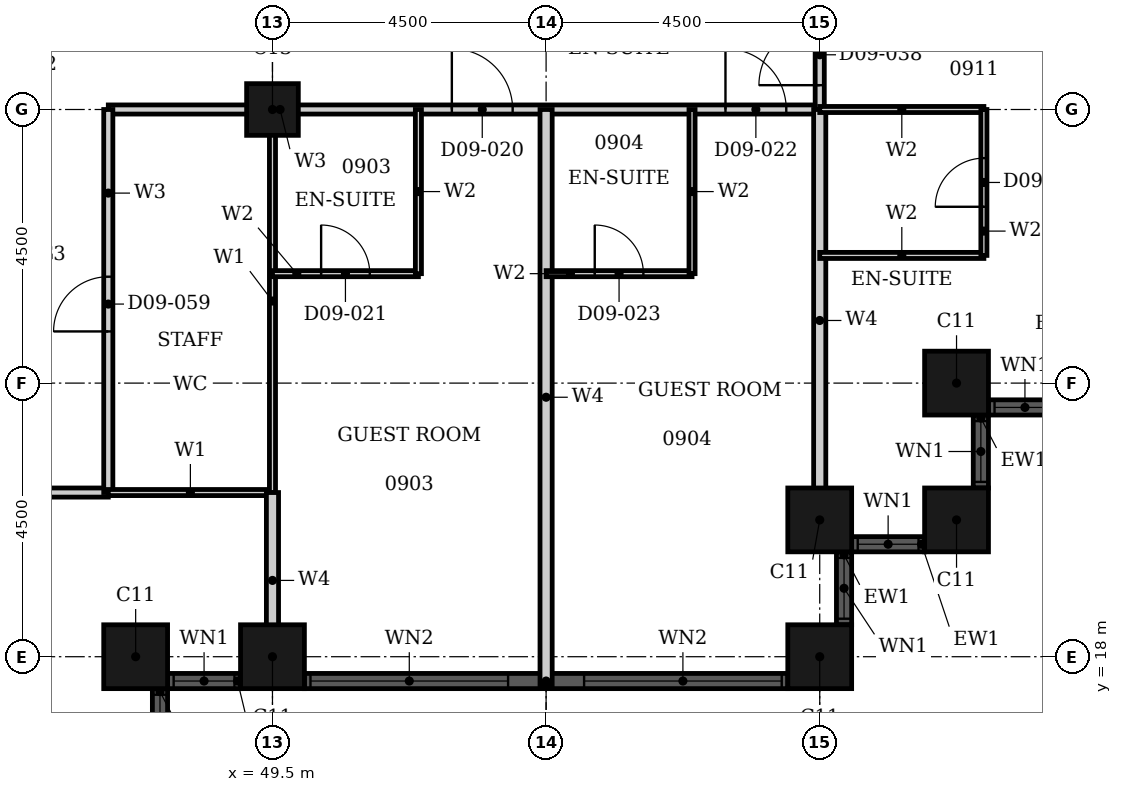
"""IFC4 building model, lengths in metres.
Left out: names, types, materials, properties, quantities, classifications, styles, units other than length and angle.
Written with IfcOpenShell. Run it as: python <this file> out.ifc"""

import sys

from ifc_helpers import new_model, si_unit, direction, frame, frame_2d, origin, origin_2d, place, context, subcontext, project, spatial, rectangle, hollow_rectangle, extrude, element, fill, save


model = new_model("IFC4")
c1 = context("Model", 3, precision=1e-05, world=origin(), true_north=direction((0.0, 1.0)))
c2 = subcontext(c1, "Body", "Model", "MODEL_VIEW")
j1 = project(units=[si_unit("LENGTHUNIT", "METRE"), si_unit("PLANEANGLEUNIT", "RADIAN")], contexts=[c1])
p1 = place(None, origin())
s1 = spatial("IfcSite", under=j1, at=p1, CompositionType="ELEMENT")
p2 = place(p1, origin())
s2 = spatial("IfcBuilding", under=s1, at=p2, CompositionType="ELEMENT")
p3 = place(p2, frame((0.0, 0.0, 44.4)))
s3 = spatial("IfcBuildingStorey", under=s2, at=p3, CompositionType="ELEMENT", Elevation=44.4)
for number, where, z_axis, x_axis in (
    (1, (47.25, 18.0, 0.0), (0.0, 0.0, 1.0), (1.0, 0.0, 0.0)),
    (2, (49.5, 18.0, 0.0), (0.0, 0.0, 1.0), (1.0, 0.0, 0.0)),
    (3, (58.5, 18.0, 0.0), (0.0, 0.0, 1.0), (1.0, 0.0, 0.0)),
    (4, (58.5, 20.25, 0.0), (0.0, 0.0, 1.0), (1.0, 0.0, 0.0)),
    (5, (60.75, 20.25, 0.0), (0.0, 0.0, 1.0), (1.0, 0.0, 0.0)),
    (6, (60.75, 22.5, 0.0), (0.0, 0.0, 1.0), (1.0, 0.0, 0.0)),
):
    element("IfcColumn", number, at=place(p3, frame(where, z_axis=z_axis, x_axis=x_axis)), inside=s3, PredefinedType="COLUMN", context=c2, shape_type="SweptSolid", body=[
        extrude(hollow_rectangle(XDim=1.05, YDim=1.05, WallThickness=0.034, at=origin_2d()), origin(), (0.0, 0.0, 1.0), 3.6),
    ])
p4 = place(p3, frame((49.5, 27.0, 0.0), z_axis=(0.0, 0.0, 1.0), x_axis=(1.0, 0.0, 0.0)))
e7 = element("IfcColumn", 7, at=p4, inside=s3, PredefinedType="COLUMN", context=c2, shape_type="SweptSolid", body=[
    extrude(hollow_rectangle(XDim=0.85, YDim=0.85, WallThickness=0.026, at=origin_2d()), origin(), (0.0, 0.0, 1.0), 3.6),
])
p5 = place(p3, frame((47.65, 16.275, 0.0), z_axis=(0.0, 0.0, 1.0), x_axis=(0.0, 1.0, 0.0)))
e8 = element("IfcWall", 8, at=p5, inside=s3, PredefinedType="SOLIDWALL", context=c2, shape_type="SweptSolid", body=[
    extrude(rectangle(XDim=1.2, YDim=0.25, at=frame_2d((0.6, 0.0))), origin(), (0.0, 0.0, 1.0), 3.6),
])
p6 = place(p5, frame((0.1, 0.0, 0.9)))
e9 = element("IfcOpeningElement", 9, at=p6, cuts=e8, PredefinedType="OPENING", context=c2, shape_type="SweptSolid", body=[
    extrude(rectangle(XDim=1.0, YDim=2.08, at=frame_2d((0.5, 1.04))), frame((0.0, 0.135, 0.0), z_axis=(0.0, -1.0, 0.0), x_axis=(1.0, 0.0, 0.0)), (0.0, 0.0, 1.0), 0.27),
])
p7 = place(p3, frame((47.775, 17.6, 0.0), z_axis=(0.0, 0.0, 1.0), x_axis=(1.0, 0.0, 0.0)))
e10 = element("IfcWall", 10, at=p7, inside=s3, PredefinedType="SOLIDWALL", context=c2, shape_type="SweptSolid", body=[
    extrude(rectangle(XDim=1.2, YDim=0.25, at=frame_2d((0.6, 0.0))), origin(), (0.0, 0.0, 1.0), 3.6),
])
p8 = place(p7, frame((0.1, 0.0, 0.9)))
e11 = element("IfcOpeningElement", 11, at=p8, cuts=e10, PredefinedType="OPENING", context=c2, shape_type="SweptSolid", body=[
    extrude(rectangle(XDim=1.0, YDim=2.08, at=frame_2d((0.5, 1.04))), frame((0.0, 0.135, 0.0), z_axis=(0.0, -1.0, 0.0), x_axis=(1.0, 0.0, 0.0)), (0.0, 0.0, 1.0), 0.27),
])
p9 = place(p3, frame((50.025, 17.6, 0.0), z_axis=(0.0, 0.0, 1.0), x_axis=(1.0, 0.0, 0.0)))
e12 = element("IfcWall", 12, at=p9, inside=s3, PredefinedType="SOLIDWALL", context=c2, shape_type="SweptSolid", body=[
    extrude(rectangle(XDim=7.95, YDim=0.25, at=frame_2d((3.975, 0.0))), origin(), (0.0, 0.0, 1.0), 3.6),
])
p10 = place(p9, frame((0.1, 0.0, 0.9)))
e13 = element("IfcOpeningElement", 13, at=p10, cuts=e12, PredefinedType="OPENING", context=c2, shape_type="SweptSolid", body=[
    extrude(rectangle(XDim=3.25, YDim=2.08, at=frame_2d((1.625, 1.04))), frame((0.0, 0.135, 0.0), z_axis=(0.0, -1.0, 0.0), x_axis=(1.0, 0.0, 0.0)), (0.0, 0.0, 1.0), 0.27),
])
p11 = place(p9, frame((4.6, 0.0, 0.9)))
e14 = element("IfcOpeningElement", 14, at=p11, cuts=e12, PredefinedType="OPENING", context=c2, shape_type="SweptSolid", body=[
    extrude(rectangle(XDim=3.25, YDim=2.08, at=frame_2d((1.625, 1.04))), frame((0.0, 0.135, 0.0), z_axis=(0.0, -1.0, 0.0), x_axis=(1.0, 0.0, 0.0)), (0.0, 0.0, 1.0), 0.27),
])
p12 = place(p3, frame((58.9, 18.525, 0.0), z_axis=(0.0, 0.0, 1.0), x_axis=(0.0, 1.0, 0.0)))
e15 = element("IfcWall", 15, at=p12, inside=s3, PredefinedType="SOLIDWALL", context=c2, shape_type="SweptSolid", body=[
    extrude(rectangle(XDim=1.2, YDim=0.25, at=frame_2d((0.6, 0.0))), origin(), (0.0, 0.0, 1.0), 3.6),
])
p13 = place(p12, frame((0.1, 0.0, 0.9)))
e16 = element("IfcOpeningElement", 16, at=p13, cuts=e15, PredefinedType="OPENING", context=c2, shape_type="SweptSolid", body=[
    extrude(rectangle(XDim=1.0, YDim=2.08, at=frame_2d((0.5, 1.04))), frame((0.0, 0.135, 0.0), z_axis=(0.0, -1.0, 0.0), x_axis=(1.0, 0.0, 0.0)), (0.0, 0.0, 1.0), 0.27),
])
p14 = place(p3, frame((59.025, 19.85, 0.0), z_axis=(0.0, 0.0, 1.0), x_axis=(1.0, 0.0, 0.0)))
e17 = element("IfcWall", 17, at=p14, inside=s3, PredefinedType="SOLIDWALL", context=c2, shape_type="SweptSolid", body=[
    extrude(rectangle(XDim=1.2, YDim=0.25, at=frame_2d((0.6, 0.0))), origin(), (0.0, 0.0, 1.0), 3.6),
])
p15 = place(p14, frame((0.1, 0.0, 0.9)))
e18 = element("IfcOpeningElement", 18, at=p15, cuts=e17, PredefinedType="OPENING", context=c2, shape_type="SweptSolid", body=[
    extrude(rectangle(XDim=1.0, YDim=2.08, at=frame_2d((0.5, 1.04))), frame((0.0, 0.135, 0.0), z_axis=(0.0, -1.0, 0.0), x_axis=(1.0, 0.0, 0.0)), (0.0, 0.0, 1.0), 0.27),
])
p16 = place(p3, frame((61.15, 20.775, 0.0), z_axis=(0.0, 0.0, 1.0), x_axis=(0.0, 1.0, 0.0)))
e19 = element("IfcWall", 19, at=p16, inside=s3, PredefinedType="SOLIDWALL", context=c2, shape_type="SweptSolid", body=[
    extrude(rectangle(XDim=1.2, YDim=0.25, at=frame_2d((0.6, 0.0))), origin(), (0.0, 0.0, 1.0), 3.6),
])
p17 = place(p16, frame((0.1, 0.0, 0.9)))
e20 = element("IfcOpeningElement", 20, at=p17, cuts=e19, PredefinedType="OPENING", context=c2, shape_type="SweptSolid", body=[
    extrude(rectangle(XDim=1.0, YDim=2.08, at=frame_2d((0.5, 1.04))), frame((0.0, 0.135, 0.0), z_axis=(0.0, -1.0, 0.0), x_axis=(1.0, 0.0, 0.0)), (0.0, 0.0, 1.0), 0.27),
])
p18 = place(p3, frame((61.275, 22.1, 0.0), z_axis=(0.0, 0.0, 1.0), x_axis=(1.0, 0.0, 0.0)))
e21 = element("IfcWall", 21, at=p18, inside=s3, PredefinedType="SOLIDWALL", context=c2, shape_type="SweptSolid", body=[
    extrude(rectangle(XDim=1.2, YDim=0.25, at=frame_2d((0.6, 0.0))), origin(), (0.0, 0.0, 1.0), 3.6),
])
p19 = place(p18, frame((0.1, 0.0, 0.9)))
e22 = element("IfcOpeningElement", 22, at=p19, cuts=e21, PredefinedType="OPENING", context=c2, shape_type="SweptSolid", body=[
    extrude(rectangle(XDim=1.0, YDim=2.08, at=frame_2d((0.5, 1.04))), frame((0.0, 0.135, 0.0), z_axis=(0.0, -1.0, 0.0), x_axis=(1.0, 0.0, 0.0)), (0.0, 0.0, 1.0), 0.27),
])
p20 = place(p3, frame((31.5, 20.7, 0.0), z_axis=(0.0, 0.0, 1.0), x_axis=(1.0, 0.0, 0.0)))
e23 = element("IfcWall", 23, at=p20, inside=s3, PredefinedType="PARTITIONING", context=c2, shape_type="SweptSolid", body=[
    extrude(rectangle(XDim=15.3, YDim=0.15, at=frame_2d((7.65, 0.0))), origin(), (0.0, 0.0, 1.0), 3.2),
])
p21 = place(p20, frame((11.95, 0.0, 0.0)))
e24 = element("IfcOpeningElement", 24, at=p21, cuts=e23, PredefinedType="OPENING", context=c2, shape_type="SweptSolid", body=[
    extrude(rectangle(XDim=1.0, YDim=2.1, at=frame_2d((0.5, 1.05))), frame((0.0, 0.085, 0.0), z_axis=(0.0, -1.0, 0.0), x_axis=(1.0, 0.0, 0.0)), (0.0, 0.0, 1.0), 0.17),
])
p22 = place(p20, frame((1.05, 0.0, 0.0)))
e25 = element("IfcOpeningElement", 25, at=p22, cuts=e23, PredefinedType="OPENING", context=c2, shape_type="SweptSolid", body=[
    extrude(rectangle(XDim=0.9, YDim=2.1, at=frame_2d((0.45, 1.05))), frame((0.0, 0.085, 0.0), z_axis=(0.0, -1.0, 0.0), x_axis=(1.0, 0.0, 0.0)), (0.0, 0.0, 1.0), 0.17),
])
p23 = place(p20, frame((5.55, 0.0, 0.0)))
e26 = element("IfcOpeningElement", 26, at=p23, cuts=e23, PredefinedType="OPENING", context=c2, shape_type="SweptSolid", body=[
    extrude(rectangle(XDim=0.9, YDim=2.1, at=frame_2d((0.45, 1.05))), frame((0.0, 0.085, 0.0), z_axis=(0.0, -1.0, 0.0), x_axis=(1.0, 0.0, 0.0)), (0.0, 0.0, 1.0), 0.17),
])
p24 = place(p3, frame((46.8, 27.0, 0.0), z_axis=(0.0, 0.0, 1.0), x_axis=(1.0, 0.0, 0.0)))
e27 = element("IfcWall", 27, at=p24, inside=s3, PredefinedType="PARTITIONING", context=c2, shape_type="SweptSolid", body=[
    extrude(rectangle(XDim=11.7, YDim=0.15, at=frame_2d((5.85, 0.0))), origin(), (0.0, 0.0, 1.0), 2.48),
])
p25 = place(p24, frame((5.65, 0.0, 0.0)))
e28 = element("IfcOpeningElement", 28, at=p25, cuts=e27, PredefinedType="OPENING", context=c2, shape_type="SweptSolid", body=[
    extrude(rectangle(XDim=1.0, YDim=2.1, at=frame_2d((0.5, 1.05))), frame((0.0, 0.085, 0.0), z_axis=(0.0, -1.0, 0.0), x_axis=(1.0, 0.0, 0.0)), (0.0, 0.0, 1.0), 0.17),
])
p26 = place(p24, frame((10.15, 0.0, 0.0)))
e29 = element("IfcOpeningElement", 29, at=p26, cuts=e27, PredefinedType="OPENING", context=c2, shape_type="SweptSolid", body=[
    extrude(rectangle(XDim=1.0, YDim=2.1, at=frame_2d((0.5, 1.05))), frame((0.0, 0.085, 0.0), z_axis=(0.0, -1.0, 0.0), x_axis=(1.0, 0.0, 0.0)), (0.0, 0.0, 1.0), 0.17),
])
p27 = place(p3, frame((46.8, 20.7, 0.0), z_axis=(0.0, 0.0, 1.0), x_axis=(0.0, 1.0, 0.0)))
e30 = element("IfcWall", 30, at=p27, inside=s3, PredefinedType="PARTITIONING", context=c2, shape_type="SweptSolid", body=[
    extrude(rectangle(XDim=6.3, YDim=0.15, at=frame_2d((3.15, 0.0))), origin(), (0.0, 0.0, 1.0), 3.2),
])
p28 = place(p27, frame((2.65, 0.0, 0.0)))
e31 = element("IfcOpeningElement", 31, at=p28, cuts=e30, PredefinedType="OPENING", context=c2, shape_type="SweptSolid", body=[
    extrude(rectangle(XDim=0.9, YDim=2.1, at=frame_2d((0.45, 1.05))), frame((0.0, 0.085, 0.0), z_axis=(0.0, -1.0, 0.0), x_axis=(1.0, 0.0, 0.0)), (0.0, 0.0, 1.0), 0.17),
])
p29 = place(p3, frame((58.5, 27.0, 0.0), z_axis=(0.0, 0.0, 1.0), x_axis=(0.0, 1.0, 0.0)))
e32 = element("IfcWall", 32, at=p29, inside=s3, PredefinedType="PARTITIONING", context=c2, shape_type="SweptSolid", body=[
    extrude(rectangle(XDim=1.8, YDim=0.15, at=frame_2d((0.9, 0.0))), origin(), (0.0, 0.0, 1.0), 3.2),
])
p30 = place(p29, frame((0.4, 0.0, 0.0)))
e33 = element("IfcOpeningElement", 33, at=p30, cuts=e32, PredefinedType="OPENING", context=c2, shape_type="SweptSolid", body=[
    extrude(rectangle(XDim=1.0, YDim=2.1, at=frame_2d((0.5, 1.05))), frame((0.0, 0.085, 0.0), z_axis=(0.0, -1.0, 0.0), x_axis=(1.0, 0.0, 0.0)), (0.0, 0.0, 1.0), 0.17),
])
p31 = place(p3, frame((46.8, 20.7, 0.0), z_axis=(0.0, 0.0, 1.0), x_axis=(1.0, 0.0, 0.0)))
e34 = element("IfcWall", 34, at=p31, inside=s3, PredefinedType="PARTITIONING", context=c2, shape_type="SweptSolid", body=[
    extrude(rectangle(XDim=2.7, YDim=0.1, at=frame_2d((1.35, 0.0))), origin(), (0.0, 0.0, 1.0), 3.2),
])
p32 = place(p3, frame((49.5, 20.7, 0.0), z_axis=(0.0, 0.0, 1.0), x_axis=(0.0, 1.0, 0.0)))
e35 = element("IfcWall", 35, at=p32, inside=s3, PredefinedType="PARTITIONING", context=c2, shape_type="SweptSolid", body=[
    extrude(rectangle(XDim=6.3, YDim=0.1, at=frame_2d((3.15, 0.0))), origin(), (0.0, 0.0, 1.0), 2.28),
])
p33 = place(p3, frame((49.5, 17.81, 0.0), z_axis=(0.0, 0.0, 1.0), x_axis=(0.0, 1.0, 0.0)))
e36 = element("IfcWall", 36, at=p33, inside=s3, PredefinedType="PARTITIONING", context=c2, shape_type="SweptSolid", body=[
    extrude(rectangle(XDim=2.89, YDim=0.2, at=frame_2d((1.445, 0.0))), origin(), (0.0, 0.0, 1.0), 2.28),
])
p34 = place(p3, frame((54.0, 17.535, 0.0), z_axis=(0.0, 0.0, 1.0), x_axis=(0.0, 1.0, 0.0)))
e37 = element("IfcWall", 37, at=p34, inside=s3, PredefinedType="PARTITIONING", context=c2, shape_type="SweptSolid", body=[
    extrude(rectangle(XDim=9.465, YDim=0.2, at=frame_2d((4.732, 0.0))), origin(), (0.0, 0.0, 1.0), 3.2),
])
p35 = place(p3, frame((58.5, 20.06, 0.0), z_axis=(0.0, 0.0, 1.0), x_axis=(0.0, 1.0, 0.0)))
e38 = element("IfcWall", 38, at=p35, inside=s3, PredefinedType="PARTITIONING", context=c2, shape_type="SweptSolid", body=[
    extrude(rectangle(XDim=6.94, YDim=0.2, at=frame_2d((3.47, 0.0))), origin(), (0.0, 0.0, 1.0), 3.2),
])
p36 = place(p3, frame((49.5, 24.3, 0.0), z_axis=(0.0, 0.0, 1.0), x_axis=(1.0, 0.0, 0.0)))
e39 = element("IfcWall", 39, at=p36, inside=s3, PredefinedType="PARTITIONING", context=c2, shape_type="SweptSolid", body=[
    extrude(rectangle(XDim=2.4, YDim=0.1, at=frame_2d((1.2, 0.0))), origin(), (0.0, 0.0, 1.0), 3.2),
])
p37 = place(p36, frame((0.8, 0.0, 0.0)))
e40 = element("IfcOpeningElement", 40, at=p37, cuts=e39, PredefinedType="OPENING", context=c2, shape_type="SweptSolid", body=[
    extrude(rectangle(XDim=0.8, YDim=2.1, at=frame_2d((0.4, 1.05))), frame((0.0, 0.06, 0.0), z_axis=(0.0, -1.0, 0.0), x_axis=(1.0, 0.0, 0.0)), (0.0, 0.0, 1.0), 0.12),
])
p38 = place(p3, frame((54.0, 24.3, 0.0), z_axis=(0.0, 0.0, 1.0), x_axis=(1.0, 0.0, 0.0)))
e41 = element("IfcWall", 41, at=p38, inside=s3, PredefinedType="PARTITIONING", context=c2, shape_type="SweptSolid", body=[
    extrude(rectangle(XDim=2.4, YDim=0.1, at=frame_2d((1.2, 0.0))), origin(), (0.0, 0.0, 1.0), 3.2),
])
p39 = place(p38, frame((0.8, 0.0, 0.0)))
e42 = element("IfcOpeningElement", 42, at=p39, cuts=e41, PredefinedType="OPENING", context=c2, shape_type="SweptSolid", body=[
    extrude(rectangle(XDim=0.8, YDim=2.1, at=frame_2d((0.4, 1.05))), frame((0.0, 0.06, 0.0), z_axis=(0.0, -1.0, 0.0), x_axis=(1.0, 0.0, 0.0)), (0.0, 0.0, 1.0), 0.12),
])
p40 = place(p3, frame((58.5, 24.6, 0.0), z_axis=(0.0, 0.0, 1.0), x_axis=(1.0, 0.0, 0.0)))
e43 = element("IfcWall", 43, at=p40, inside=s3, PredefinedType="PARTITIONING", context=c2, shape_type="SweptSolid", body=[
    extrude(rectangle(XDim=2.7, YDim=0.1, at=frame_2d((1.35, 0.0))), origin(), (0.0, 0.0, 1.0), 3.2),
])
p41 = place(p3, frame((58.5, 27.0, 0.0), z_axis=(0.0, 0.0, 1.0), x_axis=(1.0, 0.0, 0.0)))
e44 = element("IfcWall", 44, at=p41, inside=s3, PredefinedType="PARTITIONING", context=c2, shape_type="SweptSolid", body=[
    extrude(rectangle(XDim=2.7, YDim=0.1, at=frame_2d((1.35, 0.0))), origin(), (0.0, 0.0, 1.0), 2.48),
])
for number, where, z_axis, x_axis in (
    (45, (51.9, 24.3, 0.0), (0.0, 0.0, 1.0), (0.0, 1.0, 0.0)),
    (46, (56.4, 24.3, 0.0), (0.0, 0.0, 1.0), (0.0, 1.0, 0.0)),
):
    element("IfcWall", number, at=place(p3, frame(where, z_axis=z_axis, x_axis=x_axis)), inside=s3, PredefinedType="PARTITIONING", context=c2, shape_type="SweptSolid", body=[
        extrude(rectangle(XDim=2.7, YDim=0.1, at=frame_2d((1.35, 0.0))), origin(), (0.0, 0.0, 1.0), 3.2),
    ])
p42 = place(p3, frame((61.2, 24.6, 0.0), z_axis=(0.0, 0.0, 1.0), x_axis=(0.0, 1.0, 0.0)))
e47 = element("IfcWall", 47, at=p42, inside=s3, PredefinedType="PARTITIONING", context=c2, shape_type="SweptSolid", body=[
    extrude(rectangle(XDim=2.4, YDim=0.1, at=frame_2d((1.2, 0.0))), origin(), (0.0, 0.0, 1.0), 3.2),
])
p43 = place(p42, frame((0.8, 0.0, 0.0)))
e48 = element("IfcOpeningElement", 48, at=p43, cuts=e47, PredefinedType="OPENING", context=c2, shape_type="SweptSolid", body=[
    extrude(rectangle(XDim=0.8, YDim=2.1, at=frame_2d((0.4, 1.05))), frame((0.0, 0.06, 0.0), z_axis=(0.0, -1.0, 0.0), x_axis=(1.0, 0.0, 0.0)), (0.0, 0.0, 1.0), 0.12),
])
p44 = place(p6, origin())
e49 = element("IfcWindow", 49, at=p44, inside=s3, PartitioningType="SINGLE_PANEL", PredefinedType="WINDOW", context=c2, shape_type="SweptSolid", body=[
    extrude(rectangle(XDim=1.0, YDim=2.08, at=frame_2d((0.5, 1.04))), frame((0.0, 0.03, 0.0), z_axis=(0.0, -1.0, 0.0), x_axis=(1.0, 0.0, 0.0)), (0.0, 0.0, 1.0), 0.06),
])
fill(e9, e49)
p45 = place(p8, origin())
e50 = element("IfcWindow", 50, at=p45, inside=s3, PartitioningType="SINGLE_PANEL", PredefinedType="WINDOW", context=c2, shape_type="SweptSolid", body=[
    extrude(rectangle(XDim=1.0, YDim=2.08, at=frame_2d((0.5, 1.04))), frame((0.0, 0.03, 0.0), z_axis=(0.0, -1.0, 0.0), x_axis=(1.0, 0.0, 0.0)), (0.0, 0.0, 1.0), 0.06),
])
fill(e11, e50)
p46 = place(p10, origin())
e51 = element("IfcWindow", 51, at=p46, inside=s3, PartitioningType="SINGLE_PANEL", PredefinedType="WINDOW", context=c2, shape_type="SweptSolid", body=[
    extrude(rectangle(XDim=3.25, YDim=2.08, at=frame_2d((1.625, 1.04))), frame((0.0, 0.03, 0.0), z_axis=(0.0, -1.0, 0.0), x_axis=(1.0, 0.0, 0.0)), (0.0, 0.0, 1.0), 0.06),
])
fill(e13, e51)
p47 = place(p11, origin())
e52 = element("IfcWindow", 52, at=p47, inside=s3, PartitioningType="SINGLE_PANEL", PredefinedType="WINDOW", context=c2, shape_type="SweptSolid", body=[
    extrude(rectangle(XDim=3.25, YDim=2.08, at=frame_2d((1.625, 1.04))), frame((0.0, 0.03, 0.0), z_axis=(0.0, -1.0, 0.0), x_axis=(1.0, 0.0, 0.0)), (0.0, 0.0, 1.0), 0.06),
])
fill(e14, e52)
p48 = place(p13, origin())
e53 = element("IfcWindow", 53, at=p48, inside=s3, PartitioningType="SINGLE_PANEL", PredefinedType="WINDOW", context=c2, shape_type="SweptSolid", body=[
    extrude(rectangle(XDim=1.0, YDim=2.08, at=frame_2d((0.5, 1.04))), frame((0.0, 0.03, 0.0), z_axis=(0.0, -1.0, 0.0), x_axis=(1.0, 0.0, 0.0)), (0.0, 0.0, 1.0), 0.06),
])
fill(e16, e53)
p49 = place(p15, origin())
e54 = element("IfcWindow", 54, at=p49, inside=s3, PartitioningType="SINGLE_PANEL", PredefinedType="WINDOW", context=c2, shape_type="SweptSolid", body=[
    extrude(rectangle(XDim=1.0, YDim=2.08, at=frame_2d((0.5, 1.04))), frame((0.0, 0.03, 0.0), z_axis=(0.0, -1.0, 0.0), x_axis=(1.0, 0.0, 0.0)), (0.0, 0.0, 1.0), 0.06),
])
fill(e18, e54)
p50 = place(p17, origin())
e55 = element("IfcWindow", 55, at=p50, inside=s3, PartitioningType="SINGLE_PANEL", PredefinedType="WINDOW", context=c2, shape_type="SweptSolid", body=[
    extrude(rectangle(XDim=1.0, YDim=2.08, at=frame_2d((0.5, 1.04))), frame((0.0, 0.03, 0.0), z_axis=(0.0, -1.0, 0.0), x_axis=(1.0, 0.0, 0.0)), (0.0, 0.0, 1.0), 0.06),
])
fill(e20, e55)
p51 = place(p19, origin())
e56 = element("IfcWindow", 56, at=p51, inside=s3, PartitioningType="SINGLE_PANEL", PredefinedType="WINDOW", context=c2, shape_type="SweptSolid", body=[
    extrude(rectangle(XDim=1.0, YDim=2.08, at=frame_2d((0.5, 1.04))), frame((0.0, 0.03, 0.0), z_axis=(0.0, -1.0, 0.0), x_axis=(1.0, 0.0, 0.0)), (0.0, 0.0, 1.0), 0.06),
])
fill(e22, e56)
p52 = place(p25, origin())
e57 = element("IfcDoor", 57, at=p52, inside=s3, OperationType="SINGLE_SWING_RIGHT", PredefinedType="DOOR", context=c2, shape_type="SweptSolid", body=[
    extrude(rectangle(XDim=1.0, YDim=2.1, at=frame_2d((0.5, 1.05))), frame((0.0, 0.025, 0.0), z_axis=(0.0, -1.0, 0.0), x_axis=(1.0, 0.0, 0.0)), (0.0, 0.0, 1.0), 0.05),
])
fill(e28, e57)
p53 = place(p37, origin())
e58 = element("IfcDoor", 58, at=p53, inside=s3, OperationType="SINGLE_SWING_RIGHT", PredefinedType="DOOR", context=c2, shape_type="SweptSolid", body=[
    extrude(rectangle(XDim=0.8, YDim=2.1, at=frame_2d((0.4, 1.05))), frame((0.0, 0.025, 0.0), z_axis=(0.0, -1.0, 0.0), x_axis=(1.0, 0.0, 0.0)), (0.0, 0.0, 1.0), 0.05),
])
fill(e40, e58)
p54 = place(p26, origin())
e59 = element("IfcDoor", 59, at=p54, inside=s3, OperationType="SINGLE_SWING_RIGHT", PredefinedType="DOOR", context=c2, shape_type="SweptSolid", body=[
    extrude(rectangle(XDim=1.0, YDim=2.1, at=frame_2d((0.5, 1.05))), frame((0.0, 0.025, 0.0), z_axis=(0.0, -1.0, 0.0), x_axis=(1.0, 0.0, 0.0)), (0.0, 0.0, 1.0), 0.05),
])
fill(e29, e59)
p55 = place(p39, origin())
e60 = element("IfcDoor", 60, at=p55, inside=s3, OperationType="SINGLE_SWING_RIGHT", PredefinedType="DOOR", context=c2, shape_type="SweptSolid", body=[
    extrude(rectangle(XDim=0.8, YDim=2.1, at=frame_2d((0.4, 1.05))), frame((0.0, 0.025, 0.0), z_axis=(0.0, -1.0, 0.0), x_axis=(1.0, 0.0, 0.0)), (0.0, 0.0, 1.0), 0.05),
])
fill(e42, e60)
p56 = place(p30, origin())
e61 = element("IfcDoor", 61, at=p56, inside=s3, OperationType="SINGLE_SWING_LEFT", PredefinedType="DOOR", context=c2, shape_type="SweptSolid", body=[
    extrude(rectangle(XDim=1.0, YDim=2.1, at=frame_2d((0.5, 1.05))), frame((0.0, 0.025, 0.0), z_axis=(0.0, -1.0, 0.0), x_axis=(1.0, 0.0, 0.0)), (0.0, 0.0, 1.0), 0.05),
])
fill(e33, e61)
p57 = place(p43, origin())
e62 = element("IfcDoor", 62, at=p57, inside=s3, OperationType="SINGLE_SWING_RIGHT", PredefinedType="DOOR", context=c2, shape_type="SweptSolid", body=[
    extrude(rectangle(XDim=0.8, YDim=2.1, at=frame_2d((0.4, 1.05))), frame((0.0, 0.025, 0.0), z_axis=(0.0, -1.0, 0.0), x_axis=(1.0, 0.0, 0.0)), (0.0, 0.0, 1.0), 0.05),
])
fill(e48, e62)
p58 = place(p28, origin())
e63 = element("IfcDoor", 63, at=p58, inside=s3, OperationType="SINGLE_SWING_RIGHT", PredefinedType="DOOR", context=c2, shape_type="SweptSolid", body=[
    extrude(rectangle(XDim=0.9, YDim=2.1, at=frame_2d((0.45, 1.05))), frame((0.0, 0.025, 0.0), z_axis=(0.0, -1.0, 0.0), x_axis=(1.0, 0.0, 0.0)), (0.0, 0.0, 1.0), 0.05),
])
fill(e31, e63)
save(model, sys.argv[1])
